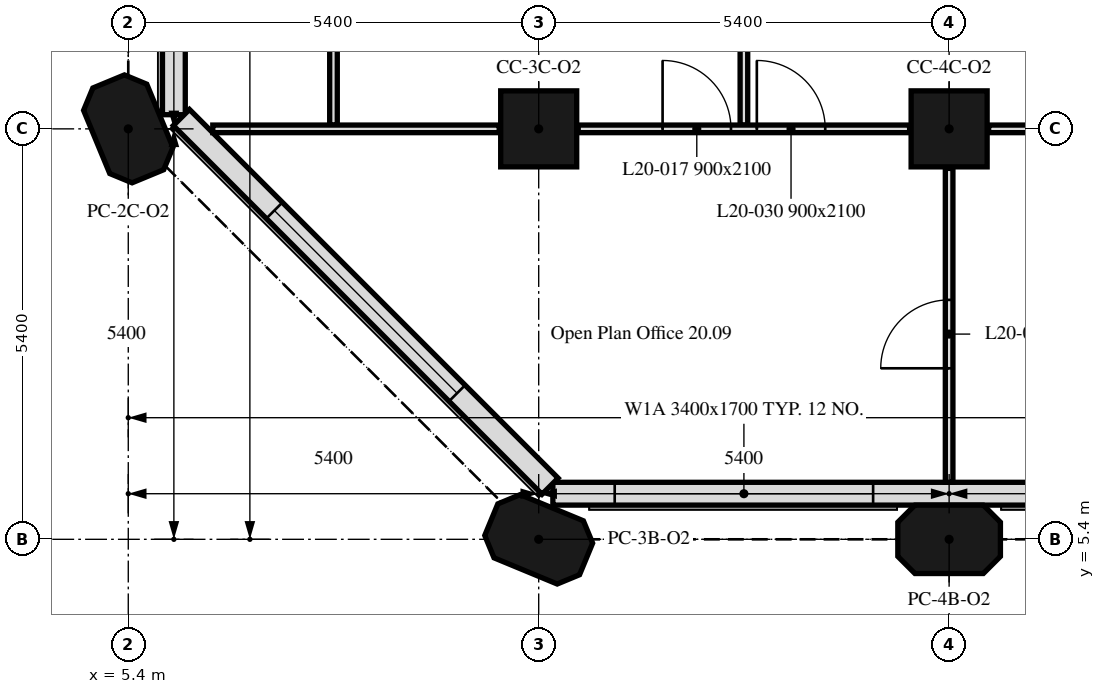
"""IFC4 building model, lengths in metres.
Left out: names, types, materials, properties, quantities, classifications, styles, units other than length and angle.
Written with IfcOpenShell. Run it as: python <this file> out.ifc"""

import sys

from ifc_helpers import new_model, si_unit, direction, frame, frame_2d, origin, origin_2d, place, context, subcontext, project, spatial, polyline, rectangle, outline, extrude, element, fill, save


model = new_model("IFC4")
c1 = context("Model", 3, precision=1e-05, world=origin(), true_north=direction((0.0, 1.0)))
c2 = subcontext(c1, "Body", "Model", "MODEL_VIEW")
j1 = project(units=[si_unit("LENGTHUNIT", "METRE"), si_unit("PLANEANGLEUNIT", "RADIAN")], contexts=[c1])
p1 = place(None, origin())
s1 = spatial("IfcSite", under=j1, at=p1, CompositionType="ELEMENT")
p2 = place(p1, origin())
s2 = spatial("IfcBuilding", under=s1, at=p2, CompositionType="ELEMENT")
p3 = place(p2, frame((0.0, 0.0, 87.8)))
s3 = spatial("IfcBuildingStorey", under=s2, at=p3, CompositionType="ELEMENT", Elevation=87.8)
for number, where, z_axis, x_axis in (
    (1, (10.8, 5.4, 0.0), (0.0, 0.0, 1.0), (-0.924, 0.383, 0.0)),
    (2, (16.2, 5.4, 0.0), (0.0, 0.0, 1.0), (1.0, 0.0, 0.0)),
    (3, (5.4, 10.8, 0.0), (0.0, 0.0, 1.0), (-0.383, 0.924, 0.0)),
):
    element("IfcColumn", number, at=place(p3, frame(where, z_axis=z_axis, x_axis=x_axis)), inside=s3, PredefinedType="COLUMN", context=c2, shape_type="SweptSolid", body=[
        extrude(outline(polyline([(-0.45, -0.45), (0.45, -0.45), (0.675, -0.225), (0.675, 0.225), (0.45, 0.45), (-0.45, 0.45), (-0.675, 0.225), (-0.675, -0.225), (-0.45, -0.45)])), origin(), (0.0, 0.0, 1.0), 3.5),
    ])
for number, where, z_axis, x_axis in (
    (4, (10.8, 10.8, 0.0), (0.0, 0.0, 1.0), (1.0, 0.0, 0.0)),
    (5, (16.2, 10.8, 0.0), (0.0, 0.0, 1.0), (1.0, 0.0, 0.0)),
):
    element("IfcColumn", number, at=place(p3, frame(where, z_axis=z_axis, x_axis=x_axis)), inside=s3, PredefinedType="COLUMN", context=c2, shape_type="SweptSolid", body=[
        extrude(rectangle(XDim=1.0, YDim=1.0, at=origin_2d()), origin(), (0.0, 0.0, 1.0), 3.5),
    ])
p4 = place(p3, frame((10.986, 6.0, 0.0), z_axis=(0.0, 0.0, 1.0), x_axis=(1.0, 0.0, 0.0)))
e6 = element("IfcWall", 6, at=p4, inside=s3, PredefinedType="SOLIDWALL", context=c2, shape_type="SweptSolid", body=[
    extrude(rectangle(XDim=32.027, YDim=0.3, at=frame_2d((16.014, 0.0))), origin(), (0.0, 0.0, 1.0), 3.5),
])
p5 = place(p4, frame((0.814, 0.0, 0.9)))
e7 = element("IfcOpeningElement", 7, at=p5, cuts=e6, PredefinedType="OPENING", context=c2, shape_type="SweptSolid", body=[
    extrude(rectangle(XDim=3.4, YDim=1.7, at=frame_2d((1.7, 0.85))), frame((0.0, 0.16, 0.0), z_axis=(0.0, -1.0, 0.0), x_axis=(1.0, 0.0, 0.0)), (0.0, 0.0, 1.0), 0.32),
])
p6 = place(p4, frame((11.614, 0.0, 0.9)))
e8 = element("IfcOpeningElement", 8, at=p6, cuts=e6, PredefinedType="OPENING", context=c2, shape_type="SweptSolid", body=[
    extrude(rectangle(XDim=3.4, YDim=1.7, at=frame_2d((1.7, 0.85))), frame((0.0, 0.16, 0.0), z_axis=(0.0, -1.0, 0.0), x_axis=(1.0, 0.0, 0.0)), (0.0, 0.0, 1.0), 0.32),
])
p7 = place(p4, frame((22.414, 0.0, 0.9)))
e9 = element("IfcOpeningElement", 9, at=p7, cuts=e6, PredefinedType="OPENING", context=c2, shape_type="SweptSolid", body=[
    extrude(rectangle(XDim=3.4, YDim=1.7, at=frame_2d((1.7, 0.85))), frame((0.0, 0.16, 0.0), z_axis=(0.0, -1.0, 0.0), x_axis=(1.0, 0.0, 0.0)), (0.0, 0.0, 1.0), 0.32),
])
p8 = place(p3, frame((6.0, 16.2, 0.0), z_axis=(0.0, 0.0, 1.0), x_axis=(0.0, -1.0, 0.0)))
e10 = element("IfcWall", 10, at=p8, inside=s3, PredefinedType="SOLIDWALL", context=c2, shape_type="SweptSolid", body=[
    extrude(rectangle(XDim=5.214, YDim=0.3, at=frame_2d((2.607, 0.0))), origin(), (0.0, 0.0, 1.0), 3.5),
])
p9 = place(p3, frame((6.099, 10.949, 0.0), z_axis=(0.0, 0.0, 1.0), x_axis=(0.707106781187, -0.707106781187, 0.0)))
e11 = element("IfcWall", 11, at=p9, inside=s3, PredefinedType="SOLIDWALL", context=c2, shape_type="SweptSolid", body=[
    extrude(rectangle(XDim=6.86, YDim=0.3, at=frame_2d((3.43, 0.0))), origin(), (0.0, 0.0, 1.0), 3.5),
])
p10 = place(p9, frame((1.73, 0.0, 0.9)))
e12 = element("IfcOpeningElement", 12, at=p10, cuts=e11, PredefinedType="OPENING", context=c2, shape_type="SweptSolid", body=[
    extrude(rectangle(XDim=3.4, YDim=1.7, at=frame_2d((1.7, 0.85))), frame((0.0, 0.16, 0.0), z_axis=(0.0, -1.0, 0.0), x_axis=(1.0, 0.0, 0.0)), (0.0, 0.0, 1.0), 0.32),
])
p11 = place(p3, frame((8.1, 10.85, 0.0), z_axis=(0.0, 0.0, 1.0), x_axis=(0.0, 1.0, 0.0)))
e13 = element("IfcWall", 13, at=p11, inside=s3, PredefinedType="PARTITIONING", context=c2, shape_type="SweptSolid", body=[
    extrude(rectangle(XDim=2.575, YDim=0.1, at=frame_2d((1.288, 0.0))), origin(), (0.0, 0.0, 1.0), 3.5),
])
p12 = place(p3, frame((6.512, 10.8, 0.0), z_axis=(0.0, 0.0, 1.0), x_axis=(1.0, 0.0, 0.0)))
e14 = element("IfcWall", 14, at=p12, inside=s3, PredefinedType="PARTITIONING", context=c2, shape_type="SweptSolid", body=[
    extrude(rectangle(XDim=3.768, YDim=0.1, at=frame_2d((1.884, 0.0))), origin(), (0.0, 0.0, 1.0), 3.5),
])
p13 = place(p3, frame((13.5, 10.85, 0.0), z_axis=(0.0, 0.0, 1.0), x_axis=(0.0, 1.0, 0.0)))
e15 = element("IfcWall", 15, at=p13, inside=s3, PredefinedType="PARTITIONING", context=c2, shape_type="SweptSolid", body=[
    extrude(rectangle(XDim=2.575, YDim=0.1, at=frame_2d((1.288, 0.0))), origin(), (0.0, 0.0, 1.0), 3.5),
])
p14 = place(p3, frame((11.32, 10.8, 0.0), z_axis=(0.0, 0.0, 1.0), x_axis=(1.0, 0.0, 0.0)))
e16 = element("IfcWall", 16, at=p14, inside=s3, PredefinedType="PARTITIONING", context=c2, shape_type="SweptSolid", body=[
    extrude(rectangle(XDim=4.36, YDim=0.1, at=frame_2d((2.18, 0.0))), origin(), (0.0, 0.0, 1.0), 3.5),
])
p15 = place(p14, frame((1.11, 0.0, 0.0)))
e17 = element("IfcOpeningElement", 17, at=p15, cuts=e16, PredefinedType="OPENING", context=c2, shape_type="SweptSolid", body=[
    extrude(rectangle(XDim=0.9, YDim=2.1, at=frame_2d((0.45, 1.05))), frame((0.0, 0.05, 0.0), z_axis=(0.0, -1.0, 0.0), x_axis=(1.0, 0.0, 0.0)), (0.0, 0.0, 1.0), 0.1),
])
p16 = place(p14, frame((2.35, 0.0, 0.0)))
e18 = element("IfcOpeningElement", 18, at=p16, cuts=e16, PredefinedType="OPENING", context=c2, shape_type="SweptSolid", body=[
    extrude(rectangle(XDim=0.9, YDim=2.1, at=frame_2d((0.45, 1.05))), frame((0.0, 0.05, 0.0), z_axis=(0.0, -1.0, 0.0), x_axis=(1.0, 0.0, 0.0)), (0.0, 0.0, 1.0), 0.1),
])
p17 = place(p3, frame((16.72, 10.8, 0.0), z_axis=(0.0, 0.0, 1.0), x_axis=(1.0, 0.0, 0.0)))
e19 = element("IfcWall", 19, at=p17, inside=s3, PredefinedType="PARTITIONING", context=c2, shape_type="SweptSolid", body=[
    extrude(rectangle(XDim=4.36, YDim=0.1, at=frame_2d((2.18, 0.0))), origin(), (0.0, 0.0, 1.0), 3.5),
])
p18 = place(p3, frame((16.2, 6.151, 0.0), z_axis=(0.0, 0.0, 1.0), x_axis=(0.0, 1.0, 0.0)))
e20 = element("IfcWall", 20, at=p18, inside=s3, PredefinedType="PARTITIONING", context=c2, shape_type="SweptSolid", body=[
    extrude(rectangle(XDim=4.129, YDim=0.1, at=frame_2d((2.064, 0.0))), origin(), (0.0, 0.0, 1.0), 3.5),
])
p19 = place(p18, frame((1.499, 0.0, 0.0)))
e21 = element("IfcOpeningElement", 21, at=p19, cuts=e20, PredefinedType="OPENING", context=c2, shape_type="SweptSolid", body=[
    extrude(rectangle(XDim=0.9, YDim=2.1, at=frame_2d((0.45, 1.05))), frame((0.0, 0.05, 0.0), z_axis=(0.0, -1.0, 0.0), x_axis=(1.0, 0.0, 0.0)), (0.0, 0.0, 1.0), 0.1),
])
p20 = place(p5, origin())
e22 = element("IfcWindow", 22, at=p20, inside=s3, PartitioningType="SINGLE_PANEL", PredefinedType="WINDOW", context=c2, shape_type="SweptSolid", body=[
    extrude(rectangle(XDim=3.4, YDim=1.7, at=frame_2d((1.7, 0.85))), frame((0.0, 0.03, 0.0), z_axis=(0.0, -1.0, 0.0), x_axis=(1.0, 0.0, 0.0)), (0.0, 0.0, 1.0), 0.06),
])
fill(e7, e22)
p21 = place(p10, origin())
e23 = element("IfcWindow", 23, at=p21, inside=s3, PartitioningType="SINGLE_PANEL", PredefinedType="WINDOW", context=c2, shape_type="SweptSolid", body=[
    extrude(rectangle(XDim=3.4, YDim=1.7, at=frame_2d((1.7, 0.85))), frame((0.0, 0.03, 0.0), z_axis=(0.0, -1.0, 0.0), x_axis=(1.0, 0.0, 0.0)), (0.0, 0.0, 1.0), 0.06),
])
fill(e12, e23)
p22 = place(p15, origin())
e24 = element("IfcDoor", 24, at=p22, inside=s3, OperationType="SINGLE_SWING_LEFT", PredefinedType="DOOR", context=c2, shape_type="SweptSolid", body=[
    extrude(rectangle(XDim=0.9, YDim=2.1, at=frame_2d((0.45, 1.05))), frame((0.0, 0.025, 0.0), z_axis=(0.0, -1.0, 0.0), x_axis=(1.0, 0.0, 0.0)), (0.0, 0.0, 1.0), 0.05),
])
fill(e17, e24)
p23 = place(p19, origin())
e25 = element("IfcDoor", 25, at=p23, inside=s3, OperationType="SINGLE_SWING_RIGHT", PredefinedType="DOOR", context=c2, shape_type="SweptSolid", body=[
    extrude(rectangle(XDim=0.9, YDim=2.1, at=frame_2d((0.45, 1.05))), frame((0.0, 0.025, 0.0), z_axis=(0.0, -1.0, 0.0), x_axis=(1.0, 0.0, 0.0)), (0.0, 0.0, 1.0), 0.05),
])
fill(e21, e25)
p24 = place(p16, origin())
e26 = element("IfcDoor", 26, at=p24, inside=s3, OperationType="SINGLE_SWING_LEFT", PredefinedType="DOOR", context=c2, shape_type="SweptSolid", body=[
    extrude(rectangle(XDim=0.9, YDim=2.1, at=frame_2d((0.45, 1.05))), frame((0.0, 0.025, 0.0), z_axis=(0.0, -1.0, 0.0), x_axis=(1.0, 0.0, 0.0)), (0.0, 0.0, 1.0), 0.05),
])
fill(e18, e26)
save(model, sys.argv[1])
